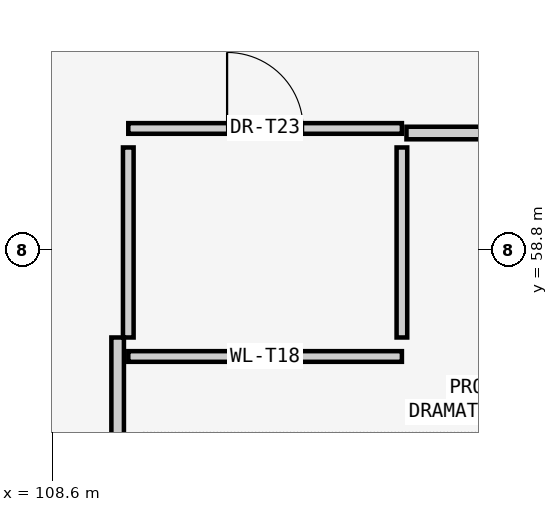
"""IFC4 building model, lengths in metres.
Left out: names, types, materials, properties, quantities, classifications, styles, units other than length and angle.
Written with IfcOpenShell. Run it as: python <this file> out.ifc"""

import sys

from ifc_helpers import new_model, si_unit, direction, frame, frame_2d, origin, place, context, subcontext, project, spatial, rectangle, extrude, element, fill, save


model = new_model("IFC4")
c1 = context("Model", 3, precision=1e-05, world=origin(), true_north=direction((0.0, 1.0)))
c2 = subcontext(c1, "Body", "Model", "MODEL_VIEW")
j1 = project(units=[si_unit("LENGTHUNIT", "METRE"), si_unit("PLANEANGLEUNIT", "RADIAN")], contexts=[c1])
p1 = place(None, origin())
s1 = spatial("IfcSite", under=j1, at=p1, CompositionType="ELEMENT")
p2 = place(p1, origin())
s2 = spatial("IfcBuilding", under=s1, at=p2, CompositionType="ELEMENT")
p3 = place(p2, frame((0.0, 0.0, 19.8)))
s3 = spatial("IfcBuildingStorey", under=s2, at=p3, CompositionType="ELEMENT", Elevation=19.8)
p4 = place(p3, frame((109.6, 57.4, 0.0), z_axis=(0.0, 0.0, 1.0), x_axis=(1.0, 0.0, 0.0)))
e1 = element("IfcWall", 1, at=p4, inside=s3, PredefinedType="PARTITIONING", context=c2, shape_type="SweptSolid", body=[
    extrude(rectangle(XDim=3.6, YDim=0.14, at=frame_2d((1.8, 0.0))), origin(), (0.0, 0.0, 1.0), 4.32),
])
p5 = place(p3, frame((109.6, 60.4, 0.0), z_axis=(0.0, 0.0, 1.0), x_axis=(1.0, 0.0, 0.0)))
e2 = element("IfcWall", 2, at=p5, inside=s3, PredefinedType="PARTITIONING", context=c2, shape_type="SweptSolid", body=[
    extrude(rectangle(XDim=3.6, YDim=0.14, at=frame_2d((1.8, 0.0))), origin(), (0.0, 0.0, 1.0), 4.32),
])
p6 = place(p5, frame((1.3, 0.0, 0.0)))
e3 = element("IfcOpeningElement", 3, at=p6, cuts=e2, PredefinedType="OPENING", context=c2, shape_type="SweptSolid", body=[
    extrude(rectangle(XDim=1.0, YDim=2.15, at=frame_2d((0.5, 1.075))), frame((0.0, 0.08, 0.0), z_axis=(0.0, -1.0, 0.0), x_axis=(1.0, 0.0, 0.0)), (0.0, 0.0, 1.0), 0.16),
])
for number, where, z_axis, x_axis in (
    (4, (109.6, 57.65, 0.0), (0.0, 0.0, 1.0), (0.0, 1.0, 0.0)),
    (5, (113.2, 57.65, 0.0), (0.0, 0.0, 1.0), (0.0, 1.0, 0.0)),
):
    element("IfcWall", number, at=place(p3, frame(where, z_axis=z_axis, x_axis=x_axis)), inside=s3, PredefinedType="PARTITIONING", context=c2, shape_type="SweptSolid", body=[
        extrude(rectangle(XDim=2.5, YDim=0.14, at=frame_2d((1.25, 0.0))), origin(), (0.0, 0.0, 1.0), 4.32),
    ])
p7 = place(p3, frame((113.26, 60.34, 0.0), z_axis=(0.0, 0.0, 1.0), x_axis=(1.0, 0.0, 0.0)))
e6 = element("IfcWall", 6, at=p7, inside=s3, PredefinedType="PARTITIONING", context=c2, shape_type="SweptSolid", body=[
    extrude(rectangle(XDim=4.28, YDim=0.165, at=frame_2d((2.14, 0.0))), origin(), (0.0, 0.0, 1.0), 4.55),
])
p8 = place(p3, frame((109.46, 55.6, 0.0), z_axis=(0.0, 0.0, 1.0), x_axis=(0.0, 1.0, 0.0)))
e7 = element("IfcWall", 7, at=p8, inside=s3, PredefinedType="PARTITIONING", context=c2, shape_type="SweptSolid", body=[
    extrude(rectangle(XDim=2.05, YDim=0.165, at=frame_2d((1.025, 0.0))), origin(), (0.0, 0.0, 1.0), 4.55),
])
p9 = place(p6, origin())
e8 = element("IfcDoor", 8, at=p9, inside=s3, OperationType="SINGLE_SWING_LEFT", PredefinedType="DOOR", context=c2, shape_type="SweptSolid", body=[
    extrude(rectangle(XDim=1.0, YDim=2.15, at=frame_2d((0.5, 1.075))), frame((0.0, 0.025, 0.0), z_axis=(0.0, -1.0, 0.0), x_axis=(1.0, 0.0, 0.0)), (0.0, 0.0, 1.0), 0.05),
])
fill(e3, e8)
save(model, sys.argv[1])
